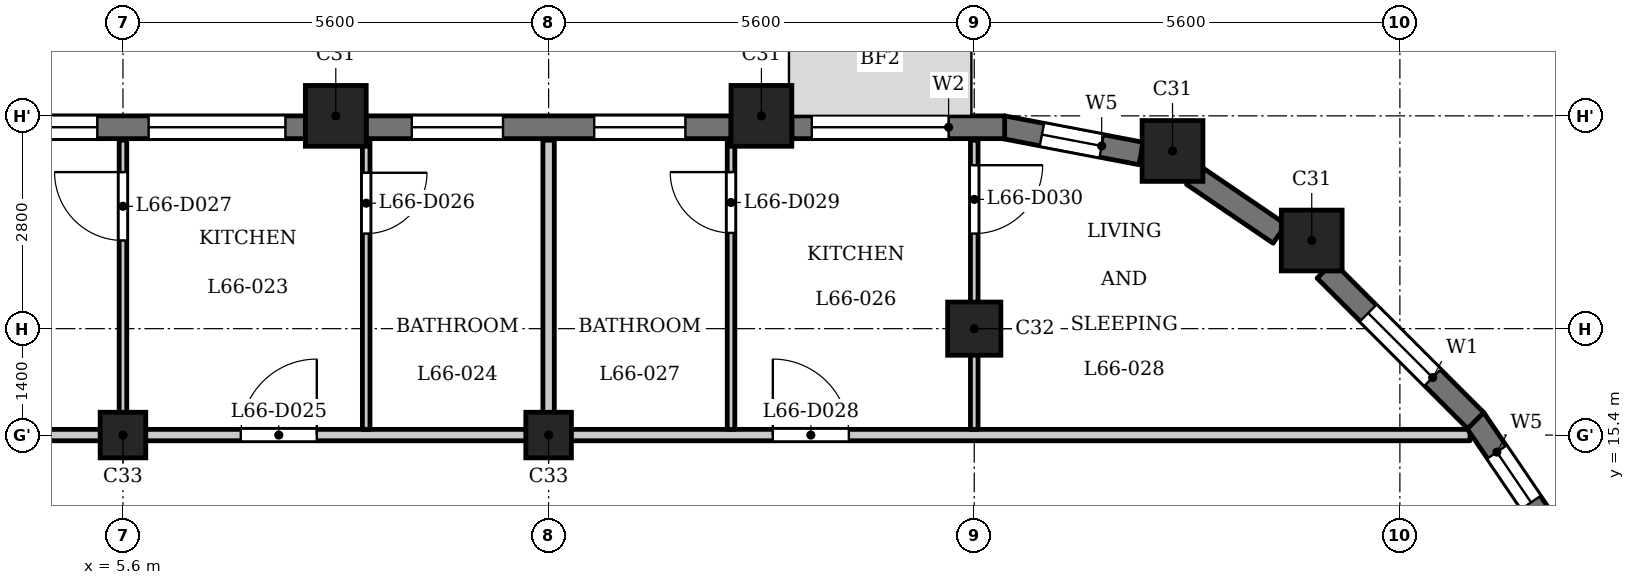
"""IFC4 building model, lengths in metres.
Left out: names, types, materials, properties, quantities, classifications, styles, units other than length and angle.
Written with IfcOpenShell. Run it as: python <this file> out.ifc"""

import sys

from ifc_helpers import new_model, si_unit, direction, frame, frame_2d, origin, origin_2d, place, context, subcontext, project, spatial, rectangle, extrude, element, fill, save


model = new_model("IFC4")
c1 = context("Model", 3, precision=1e-05, world=origin(), true_north=direction((0.0, 1.0)))
c2 = subcontext(c1, "Body", "Model", "MODEL_VIEW")
j1 = project(units=[si_unit("LENGTHUNIT", "METRE"), si_unit("PLANEANGLEUNIT", "RADIAN")], contexts=[c1])
p1 = place(None, origin())
s1 = spatial("IfcSite", under=j1, at=p1, CompositionType="ELEMENT")
p2 = place(p1, origin())
s2 = spatial("IfcBuilding", under=s1, at=p2, CompositionType="ELEMENT")
p3 = place(p2, frame((0.0, 0.0, 255.7)))
s3 = spatial("IfcBuildingStorey", under=s2, at=p3, CompositionType="ELEMENT", Elevation=255.7)
for number, where, z_axis, x_axis in (
    (1, (21.24, 17.96, 0.0), (0.0, 0.0, 1.0), (1.0, 0.0, 0.0)),
    (2, (19.409, 19.138, 0.0), (0.0, 0.0, 1.0), (1.0, 0.0, 0.0)),
    (3, (14.0, 19.6, 0.0), (0.0, 0.0, 1.0), (1.0, 0.0, 0.0)),
    (4, (8.4, 19.6, 0.0), (0.0, 0.0, 1.0), (1.0, 0.0, 0.0)),
):
    element("IfcColumn", number, at=place(p3, frame(where, z_axis=z_axis, x_axis=x_axis)), inside=s3, PredefinedType="COLUMN", context=c2, shape_type="SweptSolid", body=[
        extrude(rectangle(XDim=0.8, YDim=0.8, at=origin_2d()), origin(), (0.0, 0.0, 1.0), 3.5),
    ])
p4 = place(p3, frame((16.8, 16.8, 0.0), z_axis=(0.0, 0.0, 1.0), x_axis=(1.0, 0.0, 0.0)))
e5 = element("IfcColumn", 5, at=p4, inside=s3, PredefinedType="COLUMN", context=c2, shape_type="SweptSolid", body=[
    extrude(rectangle(XDim=0.7, YDim=0.7, at=origin_2d()), origin(), (0.0, 0.0, 1.0), 3.5),
])
for number, where, z_axis, x_axis in (
    (6, (5.6, 15.4, 0.0), (0.0, 0.0, 1.0), (1.0, 0.0, 0.0)),
    (7, (11.2, 15.4, 0.0), (0.0, 0.0, 1.0), (1.0, 0.0, 0.0)),
):
    element("IfcColumn", number, at=place(p3, frame(where, z_axis=z_axis, x_axis=x_axis)), inside=s3, PredefinedType="COLUMN", context=c2, shape_type="SweptSolid", body=[
        extrude(rectangle(XDim=0.6, YDim=0.6, at=origin_2d()), origin(), (0.0, 0.0, 1.0), 3.5),
    ])
p5 = place(p3, frame((24.422, 14.078, 0.0), z_axis=(0.0, 0.0, 1.0), x_axis=(-0.562054549384, 0.827100165347, 0.0)))
e8 = element("IfcWall", 8, at=p5, inside=s3, PredefinedType="SOLIDWALL", context=c2, shape_type="SweptSolid", body=[
    extrude(rectangle(XDim=1.856, YDim=0.3, at=frame_2d((0.928, 0.0))), origin(), (0.0, 0.0, 1.0), 2.55),
])
p6 = place(p5, frame((0.528, 0.0, 0.6)))
e9 = element("IfcOpeningElement", 9, at=p6, cuts=e8, PredefinedType="OPENING", context=c2, shape_type="SweptSolid", body=[
    extrude(rectangle(XDim=0.8, YDim=1.55, at=frame_2d((0.4, 0.775))), frame((0.0, 0.16, 0.0), z_axis=(0.0, -1.0, 0.0), x_axis=(1.0, 0.0, 0.0)), (0.0, 0.0, 1.0), 0.32),
])
p7 = place(p3, frame((23.397, 15.591, 0.0), z_axis=(0.0, 0.0, 1.0), x_axis=(-0.707150377276, 0.707063182409, 0.0)))
e10 = element("IfcWall", 10, at=p7, inside=s3, PredefinedType="SOLIDWALL", context=c2, shape_type="SweptSolid", body=[
    extrude(rectangle(XDim=2.8, YDim=0.3, at=frame_2d((1.4, 0.0))), origin(), (0.0, 0.0, 1.0), 2.55),
])
p8 = place(p7, frame((0.8, 0.0, 0.6)))
e11 = element("IfcOpeningElement", 11, at=p8, cuts=e10, PredefinedType="OPENING", context=c2, shape_type="SweptSolid", body=[
    extrude(rectangle(XDim=1.2, YDim=1.55, at=frame_2d((0.6, 0.775))), frame((0.0, 0.16, 0.0), z_axis=(0.0, -1.0, 0.0), x_axis=(1.0, 0.0, 0.0)), (0.0, 0.0, 1.0), 0.32),
])
p9 = place(p3, frame((20.817, 18.048, 0.0), z_axis=(0.0, 0.0, 1.0), x_axis=(-0.827025410886, 0.562164539747, 0.0)))
e12 = element("IfcWall", 12, at=p9, inside=s3, PredefinedType="SOLIDWALL", context=c2, shape_type="SweptSolid", body=[
    extrude(rectangle(XDim=1.377, YDim=0.3, at=frame_2d((0.688, 0.0))), origin(), (0.0, 0.0, 1.0), 2.55),
])
p10 = place(p3, frame((18.995, 19.105, 0.0), z_axis=(0.0, 0.0, 1.0), x_axis=(-0.982301706131, 0.187305520826, 0.0)))
e13 = element("IfcWall", 13, at=p10, inside=s3, PredefinedType="SOLIDWALL", context=c2, shape_type="SweptSolid", body=[
    extrude(rectangle(XDim=1.856, YDim=0.3, at=frame_2d((0.928, 0.0))), origin(), (0.0, 0.0, 1.0), 2.55),
])
p11 = place(p10, frame((0.528, 0.0, 0.6)))
e14 = element("IfcOpeningElement", 14, at=p11, cuts=e13, PredefinedType="OPENING", context=c2, shape_type="SweptSolid", body=[
    extrude(rectangle(XDim=0.8, YDim=1.55, at=frame_2d((0.4, 0.775))), frame((0.0, 0.16, 0.0), z_axis=(0.0, -1.0, 0.0), x_axis=(1.0, 0.0, 0.0)), (0.0, 0.0, 1.0), 0.32),
])
p12 = place(p3, frame((17.2, 19.45, 0.0), z_axis=(0.0, 0.0, 1.0), x_axis=(-1.0, 0.0, 0.0)))
e15 = element("IfcWall", 15, at=p12, inside=s3, PredefinedType="SOLIDWALL", context=c2, shape_type="SweptSolid", body=[
    extrude(rectangle(XDim=2.8, YDim=0.3, at=frame_2d((1.4, 0.0))), origin(), (0.0, 0.0, 1.0), 2.55),
])
p13 = place(p12, frame((0.738, 0.0, 0.9)))
e16 = element("IfcOpeningElement", 16, at=p13, cuts=e15, PredefinedType="OPENING", context=c2, shape_type="SweptSolid", body=[
    extrude(rectangle(XDim=1.8, YDim=1.25, at=frame_2d((0.9, 0.625))), frame((0.0, 0.16, 0.0), z_axis=(0.0, -1.0, 0.0), x_axis=(1.0, 0.0, 0.0)), (0.0, 0.0, 1.0), 0.32),
])
p14 = place(p3, frame((13.6, 19.45, 0.0), z_axis=(0.0, 0.0, 1.0), x_axis=(-1.0, 0.0, 0.0)))
e17 = element("IfcWall", 17, at=p14, inside=s3, PredefinedType="SOLIDWALL", context=c2, shape_type="SweptSolid", body=[
    extrude(rectangle(XDim=4.8, YDim=0.3, at=frame_2d((2.4, 0.0))), origin(), (0.0, 0.0, 1.0), 2.55),
])
p15 = place(p14, frame((0.6, 0.0, 0.6)))
e18 = element("IfcOpeningElement", 18, at=p15, cuts=e17, PredefinedType="OPENING", context=c2, shape_type="SweptSolid", body=[
    extrude(rectangle(XDim=1.2, YDim=1.55, at=frame_2d((0.6, 0.775))), frame((0.0, 0.16, 0.0), z_axis=(0.0, -1.0, 0.0), x_axis=(1.0, 0.0, 0.0)), (0.0, 0.0, 1.0), 0.32),
])
p16 = place(p14, frame((3.0, 0.0, 0.6)))
e19 = element("IfcOpeningElement", 19, at=p16, cuts=e17, PredefinedType="OPENING", context=c2, shape_type="SweptSolid", body=[
    extrude(rectangle(XDim=1.2, YDim=1.55, at=frame_2d((0.6, 0.775))), frame((0.0, 0.16, 0.0), z_axis=(0.0, -1.0, 0.0), x_axis=(1.0, 0.0, 0.0)), (0.0, 0.0, 1.0), 0.32),
])
p17 = place(p3, frame((8.0, 19.45, 0.0), z_axis=(0.0, 0.0, 1.0), x_axis=(-1.0, 0.0, 0.0)))
e20 = element("IfcWall", 20, at=p17, inside=s3, PredefinedType="SOLIDWALL", context=c2, shape_type="SweptSolid", body=[
    extrude(rectangle(XDim=4.8, YDim=0.3, at=frame_2d((2.4, 0.0))), origin(), (0.0, 0.0, 1.0), 2.55),
])
p18 = place(p17, frame((0.262, 0.0, 0.9)))
e21 = element("IfcOpeningElement", 21, at=p18, cuts=e20, PredefinedType="OPENING", context=c2, shape_type="SweptSolid", body=[
    extrude(rectangle(XDim=1.8, YDim=1.25, at=frame_2d((0.9, 0.625))), frame((0.0, 0.16, 0.0), z_axis=(0.0, -1.0, 0.0), x_axis=(1.0, 0.0, 0.0)), (0.0, 0.0, 1.0), 0.32),
])
p19 = place(p17, frame((2.738, 0.0, 0.9)))
e22 = element("IfcOpeningElement", 22, at=p19, cuts=e20, PredefinedType="OPENING", context=c2, shape_type="SweptSolid", body=[
    extrude(rectangle(XDim=1.8, YDim=1.25, at=frame_2d((0.9, 0.625))), frame((0.0, 0.16, 0.0), z_axis=(0.0, -1.0, 0.0), x_axis=(1.0, 0.0, 0.0)), (0.0, 0.0, 1.0), 0.32),
])
p20 = place(p3, frame((-23.55, 15.4, 0.0), z_axis=(0.0, 0.0, 1.0), x_axis=(1.0, 0.0, 0.0)))
e23 = element("IfcWall", 23, at=p20, inside=s3, PredefinedType="PARTITIONING", context=c2, shape_type="SweptSolid", body=[
    extrude(rectangle(XDim=46.872, YDim=0.15, at=frame_2d((23.436, 0.0))), origin(), (0.0, 0.0, 1.0), 3.2),
])
p21 = place(p20, frame((8.05, 0.0, 0.0)))
e24 = element("IfcOpeningElement", 24, at=p21, cuts=e23, PredefinedType="OPENING", context=c2, shape_type="SweptSolid", body=[
    extrude(rectangle(XDim=1.0, YDim=2.1, at=frame_2d((0.5, 1.05))), frame((0.0, 0.085, 0.0), z_axis=(0.0, -1.0, 0.0), x_axis=(1.0, 0.0, 0.0)), (0.0, 0.0, 1.0), 0.17),
])
p22 = place(p20, frame((18.5, 0.0, 0.0)))
e25 = element("IfcOpeningElement", 25, at=p22, cuts=e23, PredefinedType="OPENING", context=c2, shape_type="SweptSolid", body=[
    extrude(rectangle(XDim=1.0, YDim=2.1, at=frame_2d((0.5, 1.05))), frame((0.0, 0.085, 0.0), z_axis=(0.0, -1.0, 0.0), x_axis=(1.0, 0.0, 0.0)), (0.0, 0.0, 1.0), 0.17),
])
p23 = place(p20, frame((30.7, 0.0, 0.0)))
e26 = element("IfcOpeningElement", 26, at=p23, cuts=e23, PredefinedType="OPENING", context=c2, shape_type="SweptSolid", body=[
    extrude(rectangle(XDim=1.0, YDim=2.1, at=frame_2d((0.5, 1.05))), frame((0.0, 0.085, 0.0), z_axis=(0.0, -1.0, 0.0), x_axis=(1.0, 0.0, 0.0)), (0.0, 0.0, 1.0), 0.17),
])
p24 = place(p20, frame((37.7, 0.0, 0.0)))
e27 = element("IfcOpeningElement", 27, at=p24, cuts=e23, PredefinedType="OPENING", context=c2, shape_type="SweptSolid", body=[
    extrude(rectangle(XDim=1.0, YDim=2.1, at=frame_2d((0.5, 1.05))), frame((0.0, 0.085, 0.0), z_axis=(0.0, -1.0, 0.0), x_axis=(1.0, 0.0, 0.0)), (0.0, 0.0, 1.0), 0.17),
])
p25 = place(p3, frame((5.6, 15.475, 0.0), z_axis=(0.0, 0.0, 1.0), x_axis=(0.0, 1.0, 0.0)))
e28 = element("IfcWall", 28, at=p25, inside=s3, PredefinedType="PARTITIONING", context=c2, shape_type="SweptSolid", body=[
    extrude(rectangle(XDim=3.805, YDim=0.1, at=frame_2d((1.902, 0.0))), origin(), (0.0, 0.0, 1.0), 3.2),
])
p26 = place(p25, frame((2.485, 0.0, 0.0)))
e29 = element("IfcOpeningElement", 29, at=p26, cuts=e28, PredefinedType="OPENING", context=c2, shape_type="SweptSolid", body=[
    extrude(rectangle(XDim=0.9, YDim=2.1, at=frame_2d((0.45, 1.05))), frame((0.0, 0.06, 0.0), z_axis=(0.0, -1.0, 0.0), x_axis=(1.0, 0.0, 0.0)), (0.0, 0.0, 1.0), 0.12),
])
p27 = place(p3, frame((8.8, 15.475, 0.0), z_axis=(0.0, 0.0, 1.0), x_axis=(0.0, 1.0, 0.0)))
e30 = element("IfcWall", 30, at=p27, inside=s3, PredefinedType="PARTITIONING", context=c2, shape_type="SweptSolid", body=[
    extrude(rectangle(XDim=3.805, YDim=0.1, at=frame_2d((1.902, 0.0))), origin(), (0.0, 0.0, 1.0), 3.2),
])
p28 = place(p27, frame((2.576, 0.0, 0.0)))
e31 = element("IfcOpeningElement", 31, at=p28, cuts=e30, PredefinedType="OPENING", context=c2, shape_type="SweptSolid", body=[
    extrude(rectangle(XDim=0.8, YDim=2.1, at=frame_2d((0.4, 1.05))), frame((0.0, 0.06, 0.0), z_axis=(0.0, -1.0, 0.0), x_axis=(1.0, 0.0, 0.0)), (0.0, 0.0, 1.0), 0.12),
])
p29 = place(p3, frame((11.2, 15.475, 0.0), z_axis=(0.0, 0.0, 1.0), x_axis=(0.0, 1.0, 0.0)))
e32 = element("IfcWall", 32, at=p29, inside=s3, PredefinedType="PARTITIONING", context=c2, shape_type="SweptSolid", body=[
    extrude(rectangle(XDim=3.805, YDim=0.15, at=frame_2d((1.902, 0.0))), origin(), (0.0, 0.0, 1.0), 3.2),
])
p30 = place(p3, frame((13.6, 15.475, 0.0), z_axis=(0.0, 0.0, 1.0), x_axis=(0.0, 1.0, 0.0)))
e33 = element("IfcWall", 33, at=p30, inside=s3, PredefinedType="PARTITIONING", context=c2, shape_type="SweptSolid", body=[
    extrude(rectangle(XDim=3.805, YDim=0.1, at=frame_2d((1.902, 0.0))), origin(), (0.0, 0.0, 1.0), 3.2),
])
p31 = place(p30, frame((2.585, 0.0, 0.0)))
e34 = element("IfcOpeningElement", 34, at=p31, cuts=e33, PredefinedType="OPENING", context=c2, shape_type="SweptSolid", body=[
    extrude(rectangle(XDim=0.8, YDim=2.1, at=frame_2d((0.4, 1.05))), frame((0.0, 0.06, 0.0), z_axis=(0.0, -1.0, 0.0), x_axis=(1.0, 0.0, 0.0)), (0.0, 0.0, 1.0), 0.12),
])
p32 = place(p3, frame((16.8, 15.475, 0.0), z_axis=(0.0, 0.0, 1.0), x_axis=(0.0, 1.0, 0.0)))
e35 = element("IfcWall", 35, at=p32, inside=s3, PredefinedType="PARTITIONING", context=c2, shape_type="SweptSolid", body=[
    extrude(rectangle(XDim=3.805, YDim=0.1, at=frame_2d((1.902, 0.0))), origin(), (0.0, 0.0, 1.0), 3.2),
])
p33 = place(p32, frame((2.576, 0.0, 0.0)))
e36 = element("IfcOpeningElement", 36, at=p33, cuts=e35, PredefinedType="OPENING", context=c2, shape_type="SweptSolid", body=[
    extrude(rectangle(XDim=0.9, YDim=2.1, at=frame_2d((0.45, 1.05))), frame((0.0, 0.06, 0.0), z_axis=(0.0, -1.0, 0.0), x_axis=(1.0, 0.0, 0.0)), (0.0, 0.0, 1.0), 0.12),
])
p34 = place(p23, origin())
e37 = element("IfcDoor", 37, at=p34, inside=s3, OperationType="SINGLE_SWING_LEFT", PredefinedType="DOOR", context=c2, shape_type="SweptSolid", body=[
    extrude(rectangle(XDim=1.0, YDim=2.1, at=frame_2d((0.5, 1.05))), frame((0.0, 0.025, 0.0), z_axis=(0.0, -1.0, 0.0), x_axis=(1.0, 0.0, 0.0)), (0.0, 0.0, 1.0), 0.05),
])
fill(e26, e37)
p35 = place(p28, origin())
e38 = element("IfcDoor", 38, at=p35, inside=s3, OperationType="SINGLE_SWING_RIGHT", PredefinedType="DOOR", context=c2, shape_type="SweptSolid", body=[
    extrude(rectangle(XDim=0.8, YDim=2.1, at=frame_2d((0.4, 1.05))), frame((0.0, 0.025, 0.0), z_axis=(0.0, -1.0, 0.0), x_axis=(1.0, 0.0, 0.0)), (0.0, 0.0, 1.0), 0.05),
])
fill(e31, e38)
p36 = place(p26, origin())
e39 = element("IfcDoor", 39, at=p36, inside=s3, OperationType="SINGLE_SWING_LEFT", PredefinedType="DOOR", context=c2, shape_type="SweptSolid", body=[
    extrude(rectangle(XDim=0.9, YDim=2.1, at=frame_2d((0.45, 1.05))), frame((0.0, 0.025, 0.0), z_axis=(0.0, -1.0, 0.0), x_axis=(1.0, 0.0, 0.0)), (0.0, 0.0, 1.0), 0.05),
])
fill(e29, e39)
p37 = place(p24, origin())
e40 = element("IfcDoor", 40, at=p37, inside=s3, OperationType="SINGLE_SWING_RIGHT", PredefinedType="DOOR", context=c2, shape_type="SweptSolid", body=[
    extrude(rectangle(XDim=1.0, YDim=2.1, at=frame_2d((0.5, 1.05))), frame((0.0, 0.025, 0.0), z_axis=(0.0, -1.0, 0.0), x_axis=(1.0, 0.0, 0.0)), (0.0, 0.0, 1.0), 0.05),
])
fill(e27, e40)
p38 = place(p31, origin())
e41 = element("IfcDoor", 41, at=p38, inside=s3, OperationType="SINGLE_SWING_LEFT", PredefinedType="DOOR", context=c2, shape_type="SweptSolid", body=[
    extrude(rectangle(XDim=0.8, YDim=2.1, at=frame_2d((0.4, 1.05))), frame((0.0, 0.025, 0.0), z_axis=(0.0, -1.0, 0.0), x_axis=(1.0, 0.0, 0.0)), (0.0, 0.0, 1.0), 0.05),
])
fill(e34, e41)
p39 = place(p33, origin())
e42 = element("IfcDoor", 42, at=p39, inside=s3, OperationType="SINGLE_SWING_RIGHT", PredefinedType="DOOR", context=c2, shape_type="SweptSolid", body=[
    extrude(rectangle(XDim=0.9, YDim=2.1, at=frame_2d((0.45, 1.05))), frame((0.0, 0.025, 0.0), z_axis=(0.0, -1.0, 0.0), x_axis=(1.0, 0.0, 0.0)), (0.0, 0.0, 1.0), 0.05),
])
fill(e36, e42)
p40 = place(p6, origin())
e43 = element("IfcWindow", 43, at=p40, inside=s3, PartitioningType="SINGLE_PANEL", PredefinedType="WINDOW", context=c2, shape_type="SweptSolid", body=[
    extrude(rectangle(XDim=0.8, YDim=1.55, at=frame_2d((0.4, 0.775))), frame((0.0, 0.03, 0.0), z_axis=(0.0, -1.0, 0.0), x_axis=(1.0, 0.0, 0.0)), (0.0, 0.0, 1.0), 0.06),
])
fill(e9, e43)
p41 = place(p8, origin())
e44 = element("IfcWindow", 44, at=p41, inside=s3, PartitioningType="SINGLE_PANEL", PredefinedType="WINDOW", context=c2, shape_type="SweptSolid", body=[
    extrude(rectangle(XDim=1.2, YDim=1.55, at=frame_2d((0.6, 0.775))), frame((0.0, 0.03, 0.0), z_axis=(0.0, -1.0, 0.0), x_axis=(1.0, 0.0, 0.0)), (0.0, 0.0, 1.0), 0.06),
])
fill(e11, e44)
p42 = place(p11, origin())
e45 = element("IfcWindow", 45, at=p42, inside=s3, PartitioningType="SINGLE_PANEL", PredefinedType="WINDOW", context=c2, shape_type="SweptSolid", body=[
    extrude(rectangle(XDim=0.8, YDim=1.55, at=frame_2d((0.4, 0.775))), frame((0.0, 0.03, 0.0), z_axis=(0.0, -1.0, 0.0), x_axis=(1.0, 0.0, 0.0)), (0.0, 0.0, 1.0), 0.06),
])
fill(e14, e45)
p43 = place(p13, origin())
e46 = element("IfcWindow", 46, at=p43, inside=s3, PartitioningType="SINGLE_PANEL", PredefinedType="WINDOW", context=c2, shape_type="SweptSolid", body=[
    extrude(rectangle(XDim=1.8, YDim=1.25, at=frame_2d((0.9, 0.625))), frame((0.0, 0.03, 0.0), z_axis=(0.0, -1.0, 0.0), x_axis=(1.0, 0.0, 0.0)), (0.0, 0.0, 1.0), 0.06),
])
fill(e16, e46)
p44 = place(p15, origin())
e47 = element("IfcWindow", 47, at=p44, inside=s3, PartitioningType="SINGLE_PANEL", PredefinedType="WINDOW", context=c2, shape_type="SweptSolid", body=[
    extrude(rectangle(XDim=1.2, YDim=1.55, at=frame_2d((0.6, 0.775))), frame((0.0, 0.03, 0.0), z_axis=(0.0, -1.0, 0.0), x_axis=(1.0, 0.0, 0.0)), (0.0, 0.0, 1.0), 0.06),
])
fill(e18, e47)
p45 = place(p16, origin())
e48 = element("IfcWindow", 48, at=p45, inside=s3, PartitioningType="SINGLE_PANEL", PredefinedType="WINDOW", context=c2, shape_type="SweptSolid", body=[
    extrude(rectangle(XDim=1.2, YDim=1.55, at=frame_2d((0.6, 0.775))), frame((0.0, 0.03, 0.0), z_axis=(0.0, -1.0, 0.0), x_axis=(1.0, 0.0, 0.0)), (0.0, 0.0, 1.0), 0.06),
])
fill(e19, e48)
p46 = place(p18, origin())
e49 = element("IfcWindow", 49, at=p46, inside=s3, PartitioningType="SINGLE_PANEL", PredefinedType="WINDOW", context=c2, shape_type="SweptSolid", body=[
    extrude(rectangle(XDim=1.8, YDim=1.25, at=frame_2d((0.9, 0.625))), frame((0.0, 0.03, 0.0), z_axis=(0.0, -1.0, 0.0), x_axis=(1.0, 0.0, 0.0)), (0.0, 0.0, 1.0), 0.06),
])
fill(e21, e49)
p47 = place(p19, origin())
e50 = element("IfcWindow", 50, at=p47, inside=s3, PartitioningType="SINGLE_PANEL", PredefinedType="WINDOW", context=c2, shape_type="SweptSolid", body=[
    extrude(rectangle(XDim=1.8, YDim=1.25, at=frame_2d((0.9, 0.625))), frame((0.0, 0.03, 0.0), z_axis=(0.0, -1.0, 0.0), x_axis=(1.0, 0.0, 0.0)), (0.0, 0.0, 1.0), 0.06),
])
fill(e22, e50)
save(model, sys.argv[1])
